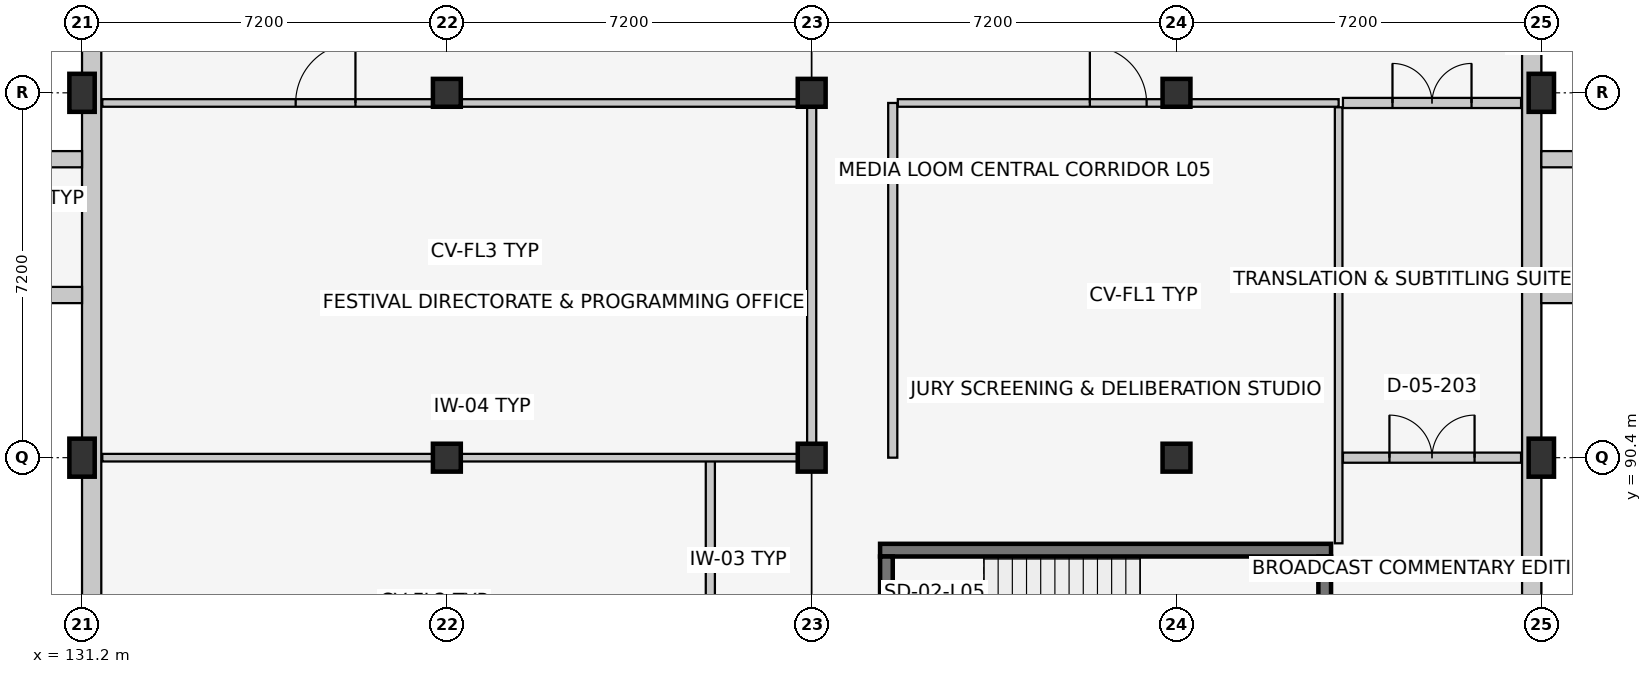
"""IFC4 building model, lengths in metres.
Left out: names, types, materials, properties, quantities, classifications, styles, units other than length and angle.
Written with IfcOpenShell. Run it as: python <this file> out.ifc"""

import sys

from ifc_helpers import new_model, si_unit, direction, frame, frame_2d, origin, origin_2d, place, context, subcontext, project, spatial, rectangle, extrude, element, fill, save


model = new_model("IFC4")
c1 = context("Model", 3, precision=1e-05, world=origin(), true_north=direction((0.0, 1.0)))
c2 = subcontext(c1, "Body", "Model", "MODEL_VIEW")
j1 = project(units=[si_unit("LENGTHUNIT", "METRE"), si_unit("PLANEANGLEUNIT", "RADIAN")], contexts=[c1])
p1 = place(None, origin())
s1 = spatial("IfcSite", under=j1, at=p1, CompositionType="ELEMENT")
p2 = place(p1, origin())
s2 = spatial("IfcBuilding", under=s1, at=p2, CompositionType="ELEMENT")
p3 = place(p2, frame((0.0, 0.0, 21.9)))
s3 = spatial("IfcBuildingStorey", under=s2, at=p3, CompositionType="ELEMENT", Elevation=21.9)
for number, where, z_axis, x_axis in (
    (1, (131.2, 90.4, 0.0), (0.0, 0.0, 1.0), (1.0, 0.0, 0.0)),
    (2, (131.2, 97.6, 0.0), (0.0, 0.0, 1.0), (1.0, 0.0, 0.0)),
):
    element("IfcColumn", number, at=place(p3, frame(where, z_axis=z_axis, x_axis=x_axis)), inside=s3, PredefinedType="COLUMN", context=c2, shape_type="SweptSolid", body=[
        extrude(rectangle(XDim=0.5, YDim=0.75, at=origin_2d()), origin(), (0.0, 0.0, 1.0), 3.9),
    ])
for number, where, z_axis, x_axis in (
    (3, (138.4, 90.4, 0.0), (0.0, 0.0, 1.0), (1.0, 0.0, 0.0)),
    (4, (138.4, 97.6, 0.0), (0.0, 0.0, 1.0), (1.0, 0.0, 0.0)),
    (5, (145.6, 90.4, 0.0), (0.0, 0.0, 1.0), (1.0, 0.0, 0.0)),
    (6, (145.6, 97.6, 0.0), (0.0, 0.0, 1.0), (1.0, 0.0, 0.0)),
    (7, (152.8, 90.4, 0.0), (0.0, 0.0, 1.0), (1.0, 0.0, 0.0)),
    (8, (152.8, 97.6, 0.0), (0.0, 0.0, 1.0), (1.0, 0.0, 0.0)),
):
    element("IfcColumn", number, at=place(p3, frame(where, z_axis=z_axis, x_axis=x_axis)), inside=s3, PredefinedType="COLUMN", context=c2, shape_type="SweptSolid", body=[
        extrude(rectangle(XDim=0.55, YDim=0.55, at=origin_2d()), origin(), (0.0, 0.0, 1.0), 3.9),
    ])
for number, where, z_axis, x_axis in (
    (9, (160.0, 90.4, 0.0), (0.0, 0.0, 1.0), (1.0, 0.0, 0.0)),
    (10, (160.0, 97.6, 0.0), (0.0, 0.0, 1.0), (1.0, 0.0, 0.0)),
):
    element("IfcColumn", number, at=place(p3, frame(where, z_axis=z_axis, x_axis=x_axis)), inside=s3, PredefinedType="COLUMN", context=c2, shape_type="SweptSolid", body=[
        extrude(rectangle(XDim=0.5, YDim=0.75, at=origin_2d()), origin(), (0.0, 0.0, 1.0), 3.9),
    ])
p4 = place(p3, frame((159.81, 112.0, 0.0), z_axis=(0.0, 0.0, 1.0), x_axis=(0.0, -1.0, 0.0)))
e11 = element("IfcWall", 11, at=p4, inside=s3, PredefinedType="SOLIDWALL", context=c2, shape_type="SweptSolid", body=[
    extrude(rectangle(XDim=28.8, YDim=0.38, at=frame_2d((14.4, 0.0))), origin(), (0.0, 0.0, 1.0), 2.915),
])
p5 = place(p3, frame((160.0, 93.61, 0.0), z_axis=(0.0, 0.0, 1.0), x_axis=(1.0, 0.0, 0.0)))
e12 = element("IfcWall", 12, at=p5, inside=s3, PredefinedType="SOLIDWALL", context=c2, shape_type="SweptSolid", body=[
    extrude(rectangle(XDim=1.793, YDim=0.32, at=frame_2d((0.896, 0.0))), origin(), (0.0, 0.0, 1.0), 3.64),
])
p6 = place(p3, frame((160.0, 96.29, 0.0), z_axis=(0.0, 0.0, 1.0), x_axis=(1.0, 0.0, 0.0)))
e13 = element("IfcWall", 13, at=p6, inside=s3, PredefinedType="SOLIDWALL", context=c2, shape_type="SweptSolid", body=[
    extrude(rectangle(XDim=1.35, YDim=0.32, at=frame_2d((0.675, 0.0))), origin(), (0.0, 0.0, 1.0), 3.64),
])
p7 = place(p3, frame((131.39, 83.2, 0.0), z_axis=(0.0, 0.0, 1.0), x_axis=(0.0, 1.0, 0.0)))
e14 = element("IfcWall", 14, at=p7, inside=s3, PredefinedType="SOLIDWALL", context=c2, shape_type="SweptSolid", body=[
    extrude(rectangle(XDim=28.8, YDim=0.38, at=frame_2d((14.4, 0.0))), origin(), (0.0, 0.0, 1.0), 2.915),
])
p8 = place(p3, frame((131.2, 93.61, 0.0), z_axis=(0.0, 0.0, 1.0), x_axis=(-1.0, 0.0, 0.0)))
e15 = element("IfcWall", 15, at=p8, inside=s3, PredefinedType="SOLIDWALL", context=c2, shape_type="SweptSolid", body=[
    extrude(rectangle(XDim=1.35, YDim=0.32, at=frame_2d((0.675, 0.0))), origin(), (0.0, 0.0, 1.0), 3.64),
])
p9 = place(p3, frame((131.2, 96.29, 0.0), z_axis=(0.0, 0.0, 1.0), x_axis=(-1.0, 0.0, 0.0)))
e16 = element("IfcWall", 16, at=p9, inside=s3, PredefinedType="SOLIDWALL", context=c2, shape_type="SweptSolid", body=[
    extrude(rectangle(XDim=1.793, YDim=0.32, at=frame_2d((0.896, 0.0))), origin(), (0.0, 0.0, 1.0), 3.64),
])
p10 = place(p3, frame((155.85, 88.575, 0.0), z_axis=(0.0, 0.0, 1.0), x_axis=(-1.0, 0.0, 0.0)))
e17 = element("IfcWall", 17, at=p10, inside=s3, PredefinedType="SHEAR", context=c2, shape_type="SweptSolid", body=[
    extrude(rectangle(XDim=8.9, YDim=0.25, at=frame_2d((4.45, 0.0))), origin(), (0.0, 0.0, 1.0), 3.66),
])
p11 = place(p3, frame((147.075, 88.45, 0.0), z_axis=(0.0, 0.0, 1.0), x_axis=(0.0, -1.0, 0.0)))
e18 = element("IfcWall", 18, at=p11, inside=s3, PredefinedType="SHEAR", context=c2, shape_type="SweptSolid", body=[
    extrude(rectangle(XDim=3.85, YDim=0.25, at=frame_2d((1.925, 0.0))), origin(), (0.0, 0.0, 1.0), 3.66),
])
p12 = place(p11, frame((1.325, 0.0, 0.0)))
e19 = element("IfcOpeningElement", 19, at=p12, cuts=e18, PredefinedType="OPENING", context=c2, shape_type="SweptSolid", body=[
    extrude(rectangle(XDim=1.2, YDim=2.15, at=frame_2d((0.6, 1.075))), frame((0.0, 0.137, 0.0), z_axis=(0.0, -1.0, 0.0), x_axis=(1.0, 0.0, 0.0)), (0.0, 0.0, 1.0), 0.274),
])
p13 = place(p3, frame((155.725, 84.6, 0.0), z_axis=(0.0, 0.0, 1.0), x_axis=(0.0, 1.0, 0.0)))
e20 = element("IfcWall", 20, at=p13, inside=s3, PredefinedType="SHEAR", context=c2, shape_type="SweptSolid", body=[
    extrude(rectangle(XDim=3.85, YDim=0.25, at=frame_2d((1.925, 0.0))), origin(), (0.0, 0.0, 1.0), 3.66),
])
p14 = place(p3, frame((143.6, 83.6, 0.0), z_axis=(0.0, 0.0, 1.0), x_axis=(0.0, 1.0, 0.0)))
e21 = element("IfcWall", 21, at=p14, inside=s3, PredefinedType="PARTITIONING", context=c2, shape_type="SweptSolid", body=[
    extrude(rectangle(XDim=6.8, YDim=0.18, at=frame_2d((3.4, 0.0))), origin(), (0.0, 0.0, 1.0), 3.66),
])
p15 = place(p14, frame((2.86, 0.0, 0.0)))
e22 = element("IfcOpeningElement", 22, at=p15, cuts=e21, PredefinedType="OPENING", context=c2, shape_type="SweptSolid", body=[
    extrude(rectangle(XDim=1.08, YDim=2.15, at=frame_2d((0.54, 1.075))), frame((0.0, 0.102, 0.0), z_axis=(0.0, -1.0, 0.0), x_axis=(1.0, 0.0, 0.0)), (0.0, 0.0, 1.0), 0.204),
])
p16 = place(p3, frame((145.6, 90.4, 0.0), z_axis=(0.0, 0.0, 1.0), x_axis=(0.0, 1.0, 0.0)))
e23 = element("IfcWall", 23, at=p16, inside=s3, PredefinedType="PARTITIONING", context=c2, shape_type="SweptSolid", body=[
    extrude(rectangle(XDim=7.0, YDim=0.18, at=frame_2d((3.5, 0.0))), origin(), (0.0, 0.0, 1.0), 3.035),
])
p17 = place(p3, frame((147.2, 90.4, 0.0), z_axis=(0.0, 0.0, 1.0), x_axis=(0.0, 1.0, 0.0)))
e24 = element("IfcWall", 24, at=p17, inside=s3, PredefinedType="PARTITIONING", context=c2, shape_type="SweptSolid", body=[
    extrude(rectangle(XDim=7.0, YDim=0.18, at=frame_2d((3.5, 0.0))), origin(), (0.0, 0.0, 1.0), 3.66),
])
p18 = place(p3, frame((131.6, 90.4, 0.0), z_axis=(0.0, 0.0, 1.0), x_axis=(1.0, 0.0, 0.0)))
e25 = element("IfcWall", 25, at=p18, inside=s3, PredefinedType="PARTITIONING", context=c2, shape_type="SweptSolid", body=[
    extrude(rectangle(XDim=13.9, YDim=0.15, at=frame_2d((6.95, 0.0))), origin(), (0.0, 0.0, 1.0), 2.785),
])
p19 = place(p3, frame((131.6, 97.4, 0.0), z_axis=(0.0, 0.0, 1.0), x_axis=(1.0, 0.0, 0.0)))
e26 = element("IfcWall", 26, at=p19, inside=s3, PredefinedType="PARTITIONING", context=c2, shape_type="SweptSolid", body=[
    extrude(rectangle(XDim=13.9, YDim=0.15, at=frame_2d((6.95, 0.0))), origin(), (0.0, 0.0, 1.0), 2.785),
])
p20 = place(p19, frame((3.816, 0.0, 0.0)))
e27 = element("IfcOpeningElement", 27, at=p20, cuts=e26, PredefinedType="OPENING", context=c2, shape_type="SweptSolid", body=[
    extrude(rectangle(XDim=1.18, YDim=2.2, at=frame_2d((0.59, 1.1))), frame((0.0, 0.087, 0.0), z_axis=(0.0, -1.0, 0.0), x_axis=(1.0, 0.0, 0.0)), (0.0, 0.0, 1.0), 0.174),
])
p21 = place(p3, frame((147.3, 97.4, 0.0), z_axis=(0.0, 0.0, 1.0), x_axis=(1.0, 0.0, 0.0)))
e28 = element("IfcWall", 28, at=p21, inside=s3, PredefinedType="PARTITIONING", context=c2, shape_type="SweptSolid", body=[
    extrude(rectangle(XDim=8.7, YDim=0.15, at=frame_2d((4.35, 0.0))), origin(), (0.0, 0.0, 1.0), 2.935),
])
p22 = place(p21, frame((3.79, 0.0, 0.0)))
e29 = element("IfcOpeningElement", 29, at=p22, cuts=e28, PredefinedType="OPENING", context=c2, shape_type="SweptSolid", body=[
    extrude(rectangle(XDim=1.12, YDim=2.15, at=frame_2d((0.56, 1.075))), frame((0.0, 0.087, 0.0), z_axis=(0.0, -1.0, 0.0), x_axis=(1.0, 0.0, 0.0)), (0.0, 0.0, 1.0), 0.174),
])
p23 = place(p3, frame((156.0, 88.71, 0.0), z_axis=(0.0, 0.0, 1.0), x_axis=(0.0, 1.0, 0.0)))
e30 = element("IfcWall", 30, at=p23, inside=s3, PredefinedType="PARTITIONING", context=c2, shape_type="SweptSolid", body=[
    extrude(rectangle(XDim=8.605, YDim=0.15, at=frame_2d((4.302, 0.0))), origin(), (0.0, 0.0, 1.0), 3.66),
])
p24 = place(p3, frame((156.085, 90.4, 0.0), z_axis=(0.0, 0.0, 1.0), x_axis=(1.0, 0.0, 0.0)))
e31 = element("IfcWall", 31, at=p24, inside=s3, PredefinedType="PARTITIONING", context=c2, shape_type="SweptSolid", body=[
    extrude(rectangle(XDim=3.515, YDim=0.2, at=frame_2d((1.758, 0.0))), origin(), (0.0, 0.0, 1.0), 2.935),
])
p25 = place(p24, frame((0.917, 0.0, 0.0)))
e32 = element("IfcOpeningElement", 32, at=p25, cuts=e31, PredefinedType="OPENING", context=c2, shape_type="SweptSolid", body=[
    extrude(rectangle(XDim=1.68, YDim=2.3, at=frame_2d((0.84, 1.15))), frame((0.0, 0.112, 0.0), z_axis=(0.0, -1.0, 0.0), x_axis=(1.0, 0.0, 0.0)), (0.0, 0.0, 1.0), 0.224),
])
p26 = place(p3, frame((156.085, 97.4, 0.0), z_axis=(0.0, 0.0, 1.0), x_axis=(1.0, 0.0, 0.0)))
e33 = element("IfcWall", 33, at=p26, inside=s3, PredefinedType="PARTITIONING", context=c2, shape_type="SweptSolid", body=[
    extrude(rectangle(XDim=3.515, YDim=0.2, at=frame_2d((1.758, 0.0))), origin(), (0.0, 0.0, 1.0), 2.935),
])
p27 = place(p26, frame((0.978, 0.0, 0.0)))
e34 = element("IfcOpeningElement", 34, at=p27, cuts=e33, PredefinedType="OPENING", context=c2, shape_type="SweptSolid", body=[
    extrude(rectangle(XDim=1.56, YDim=2.25, at=frame_2d((0.78, 1.125))), frame((0.0, 0.112, 0.0), z_axis=(0.0, -1.0, 0.0), x_axis=(1.0, 0.0, 0.0)), (0.0, 0.0, 1.0), 0.224),
])
p28 = place(p20, origin())
e35 = element("IfcDoor", 35, at=p28, inside=s3, OperationType="SINGLE_SWING_RIGHT", PredefinedType="DOOR", context=c2, shape_type="SweptSolid", body=[
    extrude(rectangle(XDim=1.18, YDim=2.2, at=frame_2d((0.59, 1.1))), frame((0.0, 0.025, 0.0), z_axis=(0.0, -1.0, 0.0), x_axis=(1.0, 0.0, 0.0)), (0.0, 0.0, 1.0), 0.05),
])
fill(e27, e35)
p29 = place(p22, origin())
e36 = element("IfcDoor", 36, at=p29, inside=s3, OperationType="SINGLE_SWING_LEFT", PredefinedType="DOOR", context=c2, shape_type="SweptSolid", body=[
    extrude(rectangle(XDim=1.12, YDim=2.15, at=frame_2d((0.56, 1.075))), frame((0.0, 0.025, 0.0), z_axis=(0.0, -1.0, 0.0), x_axis=(1.0, 0.0, 0.0)), (0.0, 0.0, 1.0), 0.05),
])
fill(e29, e36)
p30 = place(p25, origin())
e37 = element("IfcDoor", 37, at=p30, inside=s3, OperationType="DOUBLE_DOOR_SINGLE_SWING", PredefinedType="DOOR", context=c2, shape_type="SweptSolid", body=[
    extrude(rectangle(XDim=1.68, YDim=2.3, at=frame_2d((0.84, 1.15))), frame((0.0, 0.025, 0.0), z_axis=(0.0, -1.0, 0.0), x_axis=(1.0, 0.0, 0.0)), (0.0, 0.0, 1.0), 0.05),
])
fill(e32, e37)
p31 = place(p27, origin())
e38 = element("IfcDoor", 38, at=p31, inside=s3, OperationType="DOUBLE_DOOR_SINGLE_SWING", PredefinedType="DOOR", context=c2, shape_type="SweptSolid", body=[
    extrude(rectangle(XDim=1.56, YDim=2.25, at=frame_2d((0.78, 1.125))), frame((0.0, 0.025, 0.0), z_axis=(0.0, -1.0, 0.0), x_axis=(1.0, 0.0, 0.0)), (0.0, 0.0, 1.0), 0.05),
])
fill(e34, e38)
save(model, sys.argv[1])
